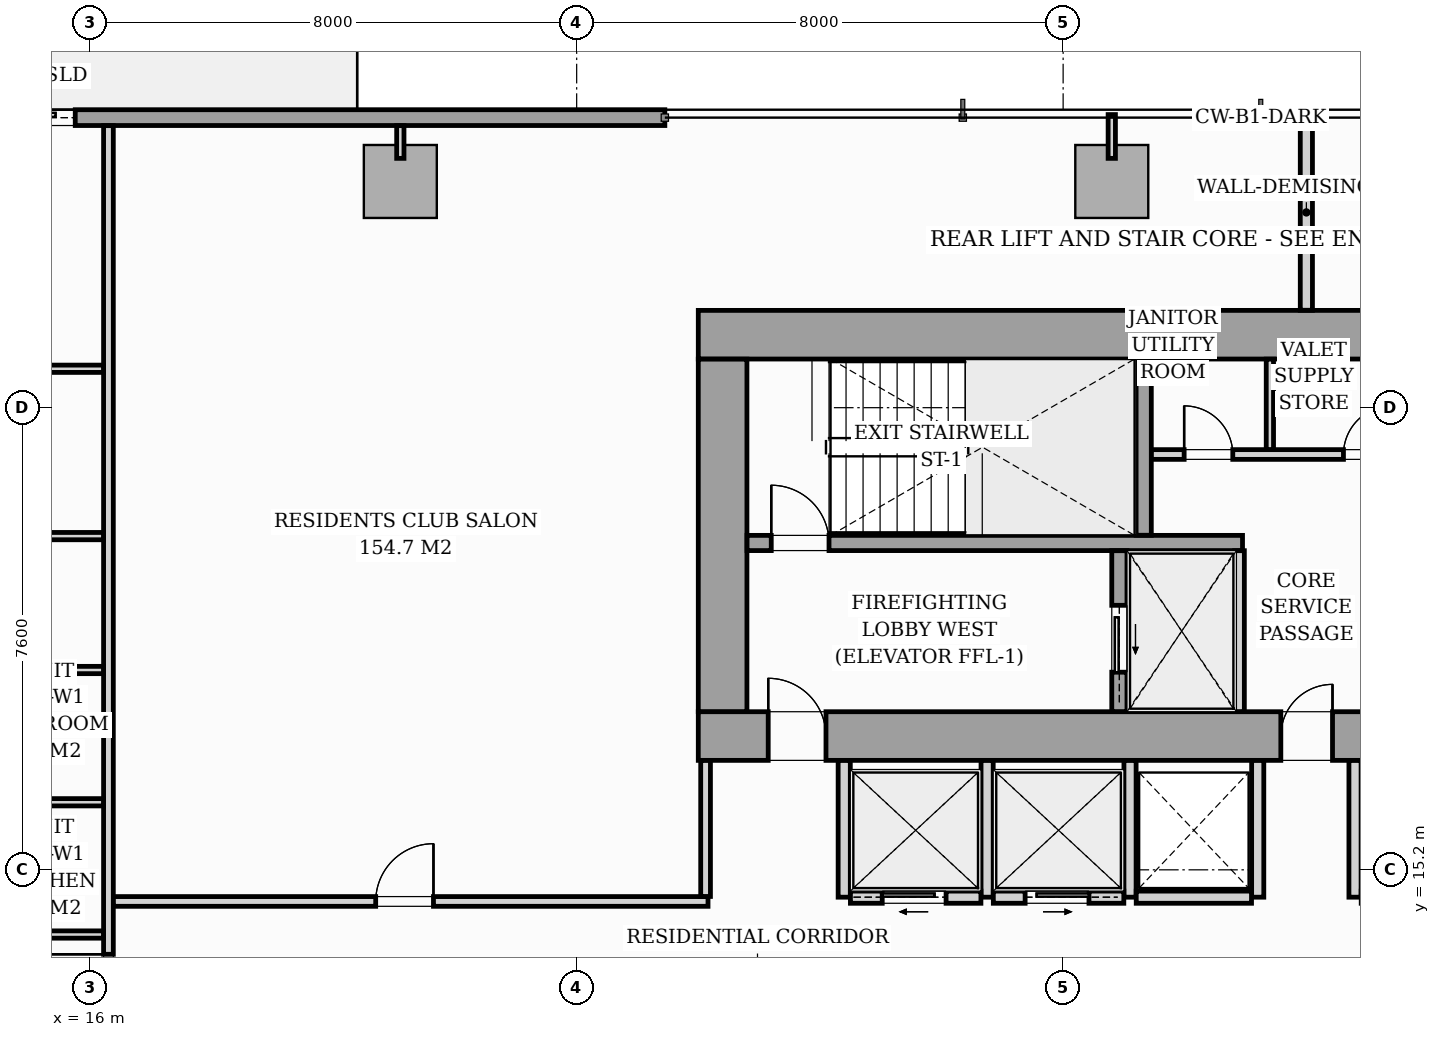
"""IFC4 building model, lengths in metres.
Left out: names, types, materials, properties, quantities, classifications, styles, units other than length and angle.
Written with IfcOpenShell. Run it as: python <this file> out.ifc"""

import sys

from ifc_helpers import new_model, si_unit, direction, frame, frame_2d, origin, origin_2d, place, context, subcontext, project, spatial, rectangle, i_section, extrude, source, transform, mapped, element, fill, save


model = new_model("IFC4")
c1 = context("Model", 3, precision=1e-05, world=origin(), true_north=direction((0.0, 1.0)))
c2 = subcontext(c1, "Body", "Model", "MODEL_VIEW")
j1 = project(units=[si_unit("LENGTHUNIT", "METRE"), si_unit("PLANEANGLEUNIT", "RADIAN")], contexts=[c1])
p1 = place(None, origin())
s1 = spatial("IfcSite", under=j1, at=p1, CompositionType="ELEMENT")
p2 = place(p1, origin())
s2 = spatial("IfcBuilding", under=s1, at=p2, CompositionType="ELEMENT")
p3 = place(p2, frame((0.0, 0.0, 58.2)))
s3 = spatial("IfcBuildingStorey", under=s2, at=p3, CompositionType="ELEMENT", Elevation=58.2)
m1 = source(origin(), c2, "Body", "SweptSolid", [
    extrude(i_section(OverallWidth=0.437, OverallDepth=0.514, WebThickness=0.061, FlangeThickness=0.097, FilletRadius=0.018, at=origin_2d()), origin(), (0.0, 0.0, 1.0), 3.196),
])
for number, where, z_axis, x_axis in (
    (1, (26.4, 17.4, 0.002), (0.0, 0.0, 1.0), (1.0, 0.0, 0.0)),
    (2, (33.12, 17.4, 0.002), (0.0, 0.0, 1.0), (1.0, 0.0, 0.0)),
    (3, (26.4, 24.0, 0.002), (0.0, 0.0, 1.0), (1.0, 0.0, 0.0)),
    (4, (33.12, 24.0, 0.002), (0.0, 0.0, 1.0), (1.0, 0.0, 0.0)),
):
    element("IfcColumn", number, at=place(p3, frame(where, z_axis=z_axis, x_axis=x_axis)), inside=s3, PredefinedType="PILASTER", context=c2, shape_type="MappedRepresentation", body=[
        mapped(m1, transform((0.0, 0.0, 0.0), scale=1.0)),
    ])
m2 = source(origin(), c2, "Body", "SweptSolid", [
    extrude(rectangle(XDim=1.2, YDim=1.2, at=origin_2d()), origin(), (0.0, 0.0, 1.0), 3.196),
])
for number, where, z_axis, x_axis in (
    (5, (21.1, 26.52, 0.002), (0.0, 0.0, 1.0), (1.0, 0.0, 0.0)),
    (6, (32.8, 26.52, 0.002), (0.0, 0.0, 1.0), (1.0, 0.0, 0.0)),
):
    element("IfcColumn", number, at=place(p3, frame(where, z_axis=z_axis, x_axis=x_axis)), inside=s3, PredefinedType="COLUMN", context=c2, shape_type="MappedRepresentation", body=[
        mapped(m2, transform((0.0, 0.0, 0.0), scale=1.0)),
    ])
p4 = place(p3, frame((8.3, 27.57, 0.0), z_axis=(0.0, 0.0, 1.0), x_axis=(1.0, 0.0, 0.0)))
e7 = element("IfcWall", 7, at=p4, inside=s3, PredefinedType="STANDARD", context=c2, shape_type="SweptSolid", body=[
    extrude(rectangle(XDim=17.15, YDim=0.26, at=frame_2d((8.575, 0.0))), origin(), (0.0, 0.0, 1.0), 2.94),
])
p5 = place(p4, frame((5.654, 0.0, 0.0)))
e8 = element("IfcOpeningElement", 8, at=p5, cuts=e7, PredefinedType="OPENING", context=c2, shape_type="SweptSolid", body=[
    extrude(rectangle(XDim=1.8, YDim=2.06, at=frame_2d((0.9, 1.03))), frame((0.0, 0.14, 0.0), z_axis=(0.0, -1.0, 0.0), x_axis=(1.0, 0.0, 0.0)), (0.0, 0.0, 1.0), 0.28),
])
p6 = place(p4, frame((2.05, 0.0, 0.65)))
e9 = element("IfcOpeningElement", 9, at=p6, cuts=e7, PredefinedType="OPENING", context=c2, shape_type="SweptSolid", body=[
    extrude(rectangle(XDim=1.6, YDim=1.5, at=frame_2d((0.8, 0.75))), frame((0.0, 0.14, 0.0), z_axis=(0.0, -1.0, 0.0), x_axis=(1.0, 0.0, 0.0)), (0.0, 0.0, 1.0), 0.28),
])
p7 = place(p3, frame((26.0, 17.4, 0.0), z_axis=(0.0, 0.0, 1.0), x_axis=(1.0, 0.0, 0.0)))
e10 = element("IfcWall", 10, at=p7, inside=s3, PredefinedType="SHEAR", context=c2, shape_type="SweptSolid", body=[
    extrude(rectangle(XDim=20.0, YDim=0.8, at=frame_2d((10.0, 0.0))), origin(), (0.0, 0.0, 1.0), 3.2),
])
p8 = place(p7, frame((1.15, 0.0, 0.0)))
e11 = element("IfcOpeningElement", 11, at=p8, cuts=e10, PredefinedType="OPENING", context=c2, shape_type="SweptSolid", body=[
    extrude(rectangle(XDim=0.95, YDim=2.06, at=frame_2d((0.475, 1.03))), frame((0.0, 0.41, 0.0), z_axis=(0.0, -1.0, 0.0), x_axis=(1.0, 0.0, 0.0)), (0.0, 0.0, 1.0), 0.82),
])
p9 = place(p7, frame((9.58, 0.0, 0.0)))
e12 = element("IfcOpeningElement", 12, at=p9, cuts=e10, PredefinedType="OPENING", context=c2, shape_type="SweptSolid", body=[
    extrude(rectangle(XDim=0.85, YDim=2.0, at=frame_2d((0.425, 1.0))), frame((0.0, 0.41, 0.0), z_axis=(0.0, -1.0, 0.0), x_axis=(1.0, 0.0, 0.0)), (0.0, 0.0, 1.0), 0.82),
])
p10 = place(p7, frame((17.75, 0.0, 0.0)))
e13 = element("IfcOpeningElement", 13, at=p10, cuts=e10, PredefinedType="OPENING", context=c2, shape_type="SweptSolid", body=[
    extrude(rectangle(XDim=0.95, YDim=2.06, at=frame_2d((0.475, 1.03))), frame((0.0, 0.41, 0.0), z_axis=(0.0, -1.0, 0.0), x_axis=(1.0, 0.0, 0.0)), (0.0, 0.0, 1.0), 0.82),
])
p11 = place(p3, frame((26.0, 24.0, 0.0), z_axis=(0.0, 0.0, 1.0), x_axis=(1.0, 0.0, 0.0)))
e14 = element("IfcWall", 14, at=p11, inside=s3, PredefinedType="SHEAR", context=c2, shape_type="SweptSolid", body=[
    extrude(rectangle(XDim=20.0, YDim=0.8, at=frame_2d((10.0, 0.0))), origin(), (0.0, 0.0, 1.0), 3.2),
])
p12 = place(p3, frame((26.4, 17.802, 0.0), z_axis=(0.0, 0.0, 1.0), x_axis=(0.0, 1.0, 0.0)))
e15 = element("IfcWall", 15, at=p12, inside=s3, PredefinedType="SHEAR", context=c2, shape_type="SweptSolid", body=[
    extrude(rectangle(XDim=5.796, YDim=0.8, at=frame_2d((2.898, 0.0))), origin(), (0.0, 0.0, 1.0), 3.2),
])
p13 = place(p3, frame((26.802, 20.575, 0.0), z_axis=(0.0, 0.0, 1.0), x_axis=(1.0, 0.0, 0.0)))
e16 = element("IfcWall", 16, at=p13, inside=s3, PredefinedType="SOLIDWALL", context=c2, shape_type="SweptSolid", body=[
    extrude(rectangle(XDim=8.148, YDim=0.25, at=frame_2d((4.074, 0.0))), origin(), (0.0, 0.0, 1.0), 3.2),
])
p14 = place(p13, frame((0.398, 0.0, 0.0)))
e17 = element("IfcOpeningElement", 17, at=p14, cuts=e16, PredefinedType="OPENING", context=c2, shape_type="SweptSolid", body=[
    extrude(rectangle(XDim=0.95, YDim=2.06, at=frame_2d((0.475, 1.03))), frame((0.0, 0.135, 0.0), z_axis=(0.0, -1.0, 0.0), x_axis=(1.0, 0.0, 0.0)), (0.0, 0.0, 1.0), 0.27),
])
p15 = place(p3, frame((33.325, 20.702, 0.0), z_axis=(0.0, 0.0, 1.0), x_axis=(0.0, 1.0, 0.0)))
e18 = element("IfcWall", 18, at=p15, inside=s3, PredefinedType="SOLIDWALL", context=c2, shape_type="SweptSolid", body=[
    extrude(rectangle(XDim=2.896, YDim=0.25, at=frame_2d((1.448, 0.0))), origin(), (0.0, 0.0, 1.0), 3.2),
])
p16 = place(p3, frame((32.925, 17.802, 0.0), z_axis=(0.0, 0.0, 1.0), x_axis=(0.0, 1.0, 0.0)))
e19 = element("IfcWall", 19, at=p16, inside=s3, PredefinedType="SOLIDWALL", context=c2, shape_type="SweptSolid", body=[
    extrude(rectangle(XDim=2.646, YDim=0.25, at=frame_2d((1.323, 0.0))), origin(), (0.0, 0.0, 1.0), 3.2),
])
p17 = place(p16, frame((0.648, 0.0, 0.0)))
e20 = element("IfcOpeningElement", 20, at=p17, cuts=e19, PredefinedType="OPENING", context=c2, shape_type="SweptSolid", body=[
    extrude(rectangle(XDim=1.1, YDim=2.08, at=frame_2d((0.55, 1.04))), frame((0.0, 0.135, 0.0), z_axis=(0.0, -1.0, 0.0), x_axis=(1.0, 0.0, 0.0)), (0.0, 0.0, 1.0), 0.27),
])
p18 = place(p3, frame((34.9, 17.802, 0.0), z_axis=(0.0, 0.0, 1.0), x_axis=(0.0, 1.0, 0.0)))
e21 = element("IfcWall", 21, at=p18, inside=s3, PredefinedType="PARTITIONING", context=c2, shape_type="SweptSolid", body=[
    extrude(rectangle(XDim=2.646, YDim=0.16, at=frame_2d((1.323, 0.0))), origin(), (0.0, 0.0, 1.0), 2.94),
])
p19 = place(p3, frame((33.452, 22.03, 0.0), z_axis=(0.0, 0.0, 1.0), x_axis=(1.0, 0.0, 0.0)))
e22 = element("IfcWall", 22, at=p19, inside=s3, PredefinedType="PARTITIONING", context=c2, shape_type="SweptSolid", body=[
    extrude(rectangle(XDim=5.096, YDim=0.16, at=frame_2d((2.548, 0.0))), origin(), (0.0, 0.0, 1.0), 2.94),
])
p20 = place(p19, frame((0.538, 0.0, 0.0)))
e23 = element("IfcOpeningElement", 23, at=p20, cuts=e22, PredefinedType="OPENING", context=c2, shape_type="SweptSolid", body=[
    extrude(rectangle(XDim=0.8, YDim=2.05, at=frame_2d((0.4, 1.025))), frame((0.0, 0.09, 0.0), z_axis=(0.0, -1.0, 0.0), x_axis=(1.0, 0.0, 0.0)), (0.0, 0.0, 1.0), 0.18),
])
p21 = place(p19, frame((3.158, 0.0, 0.0)))
e24 = element("IfcOpeningElement", 24, at=p21, cuts=e22, PredefinedType="OPENING", context=c2, shape_type="SweptSolid", body=[
    extrude(rectangle(XDim=0.8, YDim=2.05, at=frame_2d((0.4, 1.025))), frame((0.0, 0.09, 0.0), z_axis=(0.0, -1.0, 0.0), x_axis=(1.0, 0.0, 0.0)), (0.0, 0.0, 1.0), 0.18),
])
p22 = place(p3, frame((35.4, 22.112, 0.0), z_axis=(0.0, 0.0, 1.0), x_axis=(0.0, 1.0, 0.0)))
e25 = element("IfcWall", 25, at=p22, inside=s3, PredefinedType="PARTITIONING", context=c2, shape_type="SweptSolid", body=[
    extrude(rectangle(XDim=1.486, YDim=0.12, at=frame_2d((0.743, 0.0))), origin(), (0.0, 0.0, 1.0), 2.94),
])
for number, where, z_axis, x_axis in (
    (26, (28.4, 14.75, 0.0), (0.0, 0.0, 1.0), (0.0, 1.0, 0.0)),
    (27, (30.75, 14.75, 0.0), (0.0, 0.0, 1.0), (0.0, 1.0, 0.0)),
    (28, (33.1, 14.75, 0.0), (0.0, 0.0, 1.0), (0.0, 1.0, 0.0)),
):
    element("IfcWall", number, at=place(p3, frame(where, z_axis=z_axis, x_axis=x_axis)), inside=s3, PredefinedType="PARTITIONING", context=c2, shape_type="SweptSolid", body=[
        extrude(rectangle(XDim=2.248, YDim=0.2, at=frame_2d((1.124, 0.0))), origin(), (0.0, 0.0, 1.0), 2.94),
    ])
p23 = place(p3, frame((28.502, 14.75, 0.0), z_axis=(0.0, 0.0, 1.0), x_axis=(1.0, 0.0, 0.0)))
e29 = element("IfcWall", 29, at=p23, inside=s3, PredefinedType="PARTITIONING", context=c2, shape_type="SweptSolid", body=[
    extrude(rectangle(XDim=2.146, YDim=0.2, at=frame_2d((1.073, 0.0))), origin(), (0.0, 0.0, 1.0), 2.94),
])
p24 = place(p23, frame((0.523, 0.0, 0.0)))
e30 = element("IfcOpeningElement", 30, at=p24, cuts=e29, PredefinedType="OPENING", context=c2, shape_type="SweptSolid", body=[
    extrude(rectangle(XDim=1.05, YDim=2.08, at=frame_2d((0.525, 1.04))), frame((0.0, 0.11, 0.0), z_axis=(0.0, -1.0, 0.0), x_axis=(1.0, 0.0, 0.0)), (0.0, 0.0, 1.0), 0.22),
])
p25 = place(p3, frame((30.852, 14.75, 0.0), z_axis=(0.0, 0.0, 1.0), x_axis=(1.0, 0.0, 0.0)))
e31 = element("IfcWall", 31, at=p25, inside=s3, PredefinedType="PARTITIONING", context=c2, shape_type="SweptSolid", body=[
    extrude(rectangle(XDim=2.146, YDim=0.2, at=frame_2d((1.073, 0.0))), origin(), (0.0, 0.0, 1.0), 2.94),
])
p26 = place(p25, frame((0.523, 0.0, 0.0)))
e32 = element("IfcOpeningElement", 32, at=p26, cuts=e31, PredefinedType="OPENING", context=c2, shape_type="SweptSolid", body=[
    extrude(rectangle(XDim=1.05, YDim=2.08, at=frame_2d((0.525, 1.04))), frame((0.0, 0.11, 0.0), z_axis=(0.0, -1.0, 0.0), x_axis=(1.0, 0.0, 0.0)), (0.0, 0.0, 1.0), 0.22),
])
p27 = place(p3, frame((35.2, 14.75, 0.0), z_axis=(0.0, 0.0, 1.0), x_axis=(0.0, 1.0, 0.0)))
e33 = element("IfcWall", 33, at=p27, inside=s3, PredefinedType="PARTITIONING", context=c2, shape_type="SweptSolid", body=[
    extrude(rectangle(XDim=2.248, YDim=0.2, at=frame_2d((1.124, 0.0))), origin(), (0.0, 0.0, 1.0), 2.94),
])
p28 = place(p3, frame((33.202, 14.75, 0.0), z_axis=(0.0, 0.0, 1.0), x_axis=(1.0, 0.0, 0.0)))
e34 = element("IfcWall", 34, at=p28, inside=s3, PredefinedType="PARTITIONING", context=c2, shape_type="SweptSolid", body=[
    extrude(rectangle(XDim=1.896, YDim=0.2, at=frame_2d((0.948, 0.0))), origin(), (0.0, 0.0, 1.0), 2.94),
])
p29 = place(p3, frame((36.8, 14.75, 0.0), z_axis=(0.0, 0.0, 1.0), x_axis=(0.0, 1.0, 0.0)))
e35 = element("IfcWall", 35, at=p29, inside=s3, PredefinedType="PARTITIONING", context=c2, shape_type="SweptSolid", body=[
    extrude(rectangle(XDim=2.248, YDim=0.2, at=frame_2d((1.124, 0.0))), origin(), (0.0, 0.0, 1.0), 2.94),
])
p30 = place(p3, frame((16.3, 12.432, 0.0), z_axis=(0.0, 0.0, 1.0), x_axis=(0.0, 1.0, 0.0)))
e36 = element("IfcWall", 36, at=p30, inside=s3, PredefinedType="PARTITIONING", context=c2, shape_type="SweptSolid", body=[
    extrude(rectangle(XDim=15.006, YDim=0.16, at=frame_2d((7.503, 0.0))), origin(), (0.0, 0.0, 1.0), 2.94),
])
p31 = place(p30, frame((0.429, 0.0, 0.0)))
e37 = element("IfcOpeningElement", 37, at=p31, cuts=e36, PredefinedType="OPENING", context=c2, shape_type="SweptSolid", body=[
    extrude(rectangle(XDim=0.95, YDim=2.06, at=frame_2d((0.475, 1.03))), frame((0.0, 0.09, 0.0), z_axis=(0.0, -1.0, 0.0), x_axis=(1.0, 0.0, 0.0)), (0.0, 0.0, 1.0), 0.18),
])
p32 = place(p3, frame((36.0, 24.402, 0.0), z_axis=(0.0, 0.0, 1.0), x_axis=(0.0, 1.0, 0.0)))
e38 = element("IfcWall", 38, at=p32, inside=s3, PredefinedType="PARTITIONING", context=c2, shape_type="SweptSolid", body=[
    extrude(rectangle(XDim=3.218, YDim=0.2, at=frame_2d((1.609, 0.0))), origin(), (0.0, 0.0, 1.0), 2.94),
])
p33 = place(p3, frame((13.962, 16.311, 0.0), z_axis=(0.0, 0.0, 1.0), x_axis=(1.0, 0.0, 0.0)))
e39 = element("IfcWall", 39, at=p33, inside=s3, PredefinedType="PARTITIONING", context=c2, shape_type="SweptSolid", body=[
    extrude(rectangle(XDim=2.256, YDim=0.12, at=frame_2d((1.128, 0.0))), origin(), (0.0, 0.0, 1.0), 2.045),
])
for number, where, z_axis, x_axis in (
    (40, (13.962, 14.136, 0.0), (0.0, 0.0, 1.0), (1.0, 0.0, 0.0)),
    (41, (13.962, 18.486, 0.0), (0.0, 0.0, 1.0), (1.0, 0.0, 0.0)),
):
    element("IfcWall", number, at=place(p3, frame(where, z_axis=z_axis, x_axis=x_axis)), inside=s3, PredefinedType="PARTITIONING", context=c2, shape_type="SweptSolid", body=[
        extrude(rectangle(XDim=2.256, YDim=0.12, at=frame_2d((1.128, 0.0))), origin(), (0.0, 0.0, 1.0), 2.94),
    ])
p34 = place(p3, frame((5.88, 23.44, 0.0), z_axis=(0.0, 0.0, 1.0), x_axis=(1.0, 0.0, 0.0)))
e42 = element("IfcWall", 42, at=p34, inside=s3, PredefinedType="PARTITIONING", context=c2, shape_type="SweptSolid", body=[
    extrude(rectangle(XDim=10.338, YDim=0.12, at=frame_2d((5.169, 0.0))), origin(), (0.0, 0.0, 1.0), 2.94),
])
p35 = place(p34, frame((4.735, 0.0, 0.0)))
e43 = element("IfcOpeningElement", 43, at=p35, cuts=e42, PredefinedType="OPENING", context=c2, shape_type="SweptSolid", body=[
    extrude(rectangle(XDim=0.85, YDim=2.05, at=frame_2d((0.425, 1.025))), frame((0.0, 0.07, 0.0), z_axis=(0.0, -1.0, 0.0), x_axis=(1.0, 0.0, 0.0)), (0.0, 0.0, 1.0), 0.14),
])
p36 = place(p3, frame((5.88, 20.688, 0.0), z_axis=(0.0, 0.0, 1.0), x_axis=(1.0, 0.0, 0.0)))
e44 = element("IfcWall", 44, at=p36, inside=s3, PredefinedType="PARTITIONING", context=c2, shape_type="SweptSolid", body=[
    extrude(rectangle(XDim=10.338, YDim=0.12, at=frame_2d((5.169, 0.0))), origin(), (0.0, 0.0, 1.0), 2.94),
])
p37 = place(p36, frame((4.735, 0.0, 0.0)))
e45 = element("IfcOpeningElement", 45, at=p37, cuts=e44, PredefinedType="OPENING", context=c2, shape_type="SweptSolid", body=[
    extrude(rectangle(XDim=0.85, YDim=2.05, at=frame_2d((0.425, 1.025))), frame((0.0, 0.07, 0.0), z_axis=(0.0, -1.0, 0.0), x_axis=(1.0, 0.0, 0.0)), (0.0, 0.0, 1.0), 0.14),
])
p38 = place(p3, frame((16.382, 14.68, 0.0), z_axis=(0.0, 0.0, 1.0), x_axis=(1.0, 0.0, 0.0)))
e46 = element("IfcWall", 46, at=p38, inside=s3, PredefinedType="PARTITIONING", context=c2, shape_type="SweptSolid", body=[
    extrude(rectangle(XDim=9.778, YDim=0.16, at=frame_2d((4.889, 0.0))), origin(), (0.0, 0.0, 1.0), 2.94),
])
p39 = place(p38, frame((4.313, 0.0, 0.0)))
e47 = element("IfcOpeningElement", 47, at=p39, cuts=e46, PredefinedType="OPENING", context=c2, shape_type="SweptSolid", body=[
    extrude(rectangle(XDim=0.95, YDim=2.06, at=frame_2d((0.475, 1.03))), frame((0.0, 0.09, 0.0), z_axis=(0.0, -1.0, 0.0), x_axis=(1.0, 0.0, 0.0)), (0.0, 0.0, 1.0), 0.18),
])
p40 = place(p3, frame((26.12, 14.762, 0.0), z_axis=(0.0, 0.0, 1.0), x_axis=(0.0, 1.0, 0.0)))
e48 = element("IfcWall", 48, at=p40, inside=s3, PredefinedType="PARTITIONING", context=c2, shape_type="SweptSolid", body=[
    extrude(rectangle(XDim=2.236, YDim=0.16, at=frame_2d((1.118, 0.0))), origin(), (0.0, 0.0, 1.0), 2.94),
])
p41 = place(p3, frame((21.1, 26.9, 0.0), z_axis=(0.0, 0.0, 1.0), x_axis=(0.0, 1.0, 0.0)))
e49 = element("IfcWall", 49, at=p41, inside=s3, PredefinedType="PARTITIONING", context=c2, shape_type="SweptSolid", body=[
    extrude(rectangle(XDim=0.538, YDim=0.12, at=frame_2d((0.269, 0.0))), origin(), (0.0, 0.0, 1.0), 2.94),
])
p42 = place(p3, frame((32.8, 26.9, 0.0), z_axis=(0.0, 0.0, 1.0), x_axis=(0.0, 1.0, 0.0)))
e50 = element("IfcWall", 50, at=p42, inside=s3, PredefinedType="PARTITIONING", context=c2, shape_type="SweptSolid", body=[
    extrude(rectangle(XDim=0.72, YDim=0.12, at=frame_2d((0.36, 0.0))), origin(), (0.0, 0.0, 1.0), 2.94),
])
m3 = source(origin(), c2, "Body", "SweptSolid", [
    extrude(rectangle(XDim=1.8, YDim=2.06, at=frame_2d((0.9, 1.03))), frame((0.0, 0.025, 0.0), z_axis=(0.0, -1.0, 0.0), x_axis=(1.0, 0.0, 0.0)), (0.0, 0.0, 1.0), 0.05),
])
p43 = place(p5, origin())
e51 = element("IfcDoor", 51, at=p43, inside=s3, OperationType="SLIDING_TO_LEFT", PredefinedType="DOOR", context=c2, shape_type="MappedRepresentation", body=[
    mapped(m3, transform((0.0, 0.0, 0.0), scale=1.0)),
])
fill(e8, e51)
m4 = source(origin(), c2, "Body", "SweptSolid", [
    extrude(rectangle(XDim=0.95, YDim=2.06, at=frame_2d((0.475, 1.03))), frame((0.0, 0.025, 0.0), z_axis=(0.0, -1.0, 0.0), x_axis=(1.0, 0.0, 0.0)), (0.0, 0.0, 1.0), 0.05),
])
p44 = place(p8, origin())
e52 = element("IfcDoor", 52, at=p44, inside=s3, OperationType="SINGLE_SWING_LEFT", PredefinedType="DOOR", context=c2, shape_type="MappedRepresentation", body=[
    mapped(m4, transform((0.0, 0.0, 0.0), scale=1.0)),
])
fill(e11, e52)
m5 = source(origin(), c2, "Body", "SweptSolid", [
    extrude(rectangle(XDim=0.85, YDim=2.0, at=frame_2d((0.425, 1.0))), frame((0.0, 0.025, 0.0), z_axis=(0.0, -1.0, 0.0), x_axis=(1.0, 0.0, 0.0)), (0.0, 0.0, 1.0), 0.05),
])
p45 = place(p9, origin())
e53 = element("IfcDoor", 53, at=p45, inside=s3, OperationType="SINGLE_SWING_RIGHT", PredefinedType="DOOR", context=c2, shape_type="MappedRepresentation", body=[
    mapped(m5, transform((0.0, 0.0, 0.0), scale=1.0)),
])
fill(e12, e53)
p46 = place(p14, origin())
e54 = element("IfcDoor", 54, at=p46, inside=s3, OperationType="SINGLE_SWING_LEFT", PredefinedType="DOOR", context=c2, shape_type="MappedRepresentation", body=[
    mapped(m4, transform((0.0, 0.0, 0.0), scale=1.0)),
])
fill(e17, e54)
m6 = source(origin(), c2, "Body", "SweptSolid", [
    extrude(rectangle(XDim=1.1, YDim=2.08, at=frame_2d((0.55, 1.04))), frame((0.0, 0.025, 0.0), z_axis=(0.0, -1.0, 0.0), x_axis=(1.0, 0.0, 0.0)), (0.0, 0.0, 1.0), 0.05),
])
p47 = place(p17, origin())
e55 = element("IfcDoor", 55, at=p47, inside=s3, OperationType="SLIDING_TO_LEFT", PredefinedType="DOOR", context=c2, shape_type="MappedRepresentation", body=[
    mapped(m6, transform((0.0, 0.0, 0.0), scale=1.0)),
])
fill(e20, e55)
m7 = source(origin(), c2, "Body", "SweptSolid", [
    extrude(rectangle(XDim=0.8, YDim=2.05, at=frame_2d((0.4, 1.025))), frame((0.0, 0.025, 0.0), z_axis=(0.0, -1.0, 0.0), x_axis=(1.0, 0.0, 0.0)), (0.0, 0.0, 1.0), 0.05),
])
p48 = place(p20, origin())
e56 = element("IfcDoor", 56, at=p48, inside=s3, OperationType="SINGLE_SWING_LEFT", PredefinedType="DOOR", context=c2, shape_type="MappedRepresentation", body=[
    mapped(m7, transform((0.0, 0.0, 0.0), scale=1.0)),
])
fill(e23, e56)
p49 = place(p21, origin())
e57 = element("IfcDoor", 57, at=p49, inside=s3, OperationType="SINGLE_SWING_RIGHT", PredefinedType="DOOR", context=c2, shape_type="MappedRepresentation", body=[
    mapped(m7, transform((0.0, 0.0, 0.0), scale=1.0)),
])
fill(e24, e57)
m8 = source(origin(), c2, "Body", "SweptSolid", [
    extrude(rectangle(XDim=1.05, YDim=2.08, at=frame_2d((0.525, 1.04))), frame((0.0, 0.025, 0.0), z_axis=(0.0, -1.0, 0.0), x_axis=(1.0, 0.0, 0.0)), (0.0, 0.0, 1.0), 0.05),
])
p50 = place(p24, origin())
e58 = element("IfcDoor", 58, at=p50, inside=s3, OperationType="SLIDING_TO_LEFT", PredefinedType="DOOR", context=c2, shape_type="MappedRepresentation", body=[
    mapped(m8, transform((0.0, 0.0, 0.0), scale=1.0)),
])
fill(e30, e58)
p51 = place(p26, origin())
e59 = element("IfcDoor", 59, at=p51, inside=s3, OperationType="SLIDING_TO_RIGHT", PredefinedType="DOOR", context=c2, shape_type="MappedRepresentation", body=[
    mapped(m8, transform((0.0, 0.0, 0.0), scale=1.0)),
])
fill(e32, e59)
m9 = source(origin(), c2, "Body", "SweptSolid", [
    extrude(rectangle(XDim=0.95, YDim=2.06, at=frame_2d((0.475, 1.03))), frame((0.0, 0.025, 0.0), z_axis=(0.0, -1.0, 0.0), x_axis=(1.0, 0.0, 0.0)), (0.0, 0.0, 1.0), 0.05),
])
p52 = place(p31, origin())
e60 = element("IfcDoor", 60, at=p52, inside=s3, OperationType="SINGLE_SWING_RIGHT", PredefinedType="DOOR", context=c2, shape_type="MappedRepresentation", body=[
    mapped(m9, transform((0.0, 0.0, 0.0), scale=1.0)),
])
fill(e37, e60)
p53 = place(p39, origin())
e61 = element("IfcDoor", 61, at=p53, inside=s3, OperationType="SINGLE_SWING_RIGHT", PredefinedType="DOOR", context=c2, shape_type="MappedRepresentation", body=[
    mapped(m9, transform((0.0, 0.0, 0.0), scale=1.0)),
])
fill(e47, e61)
save(model, sys.argv[1])
